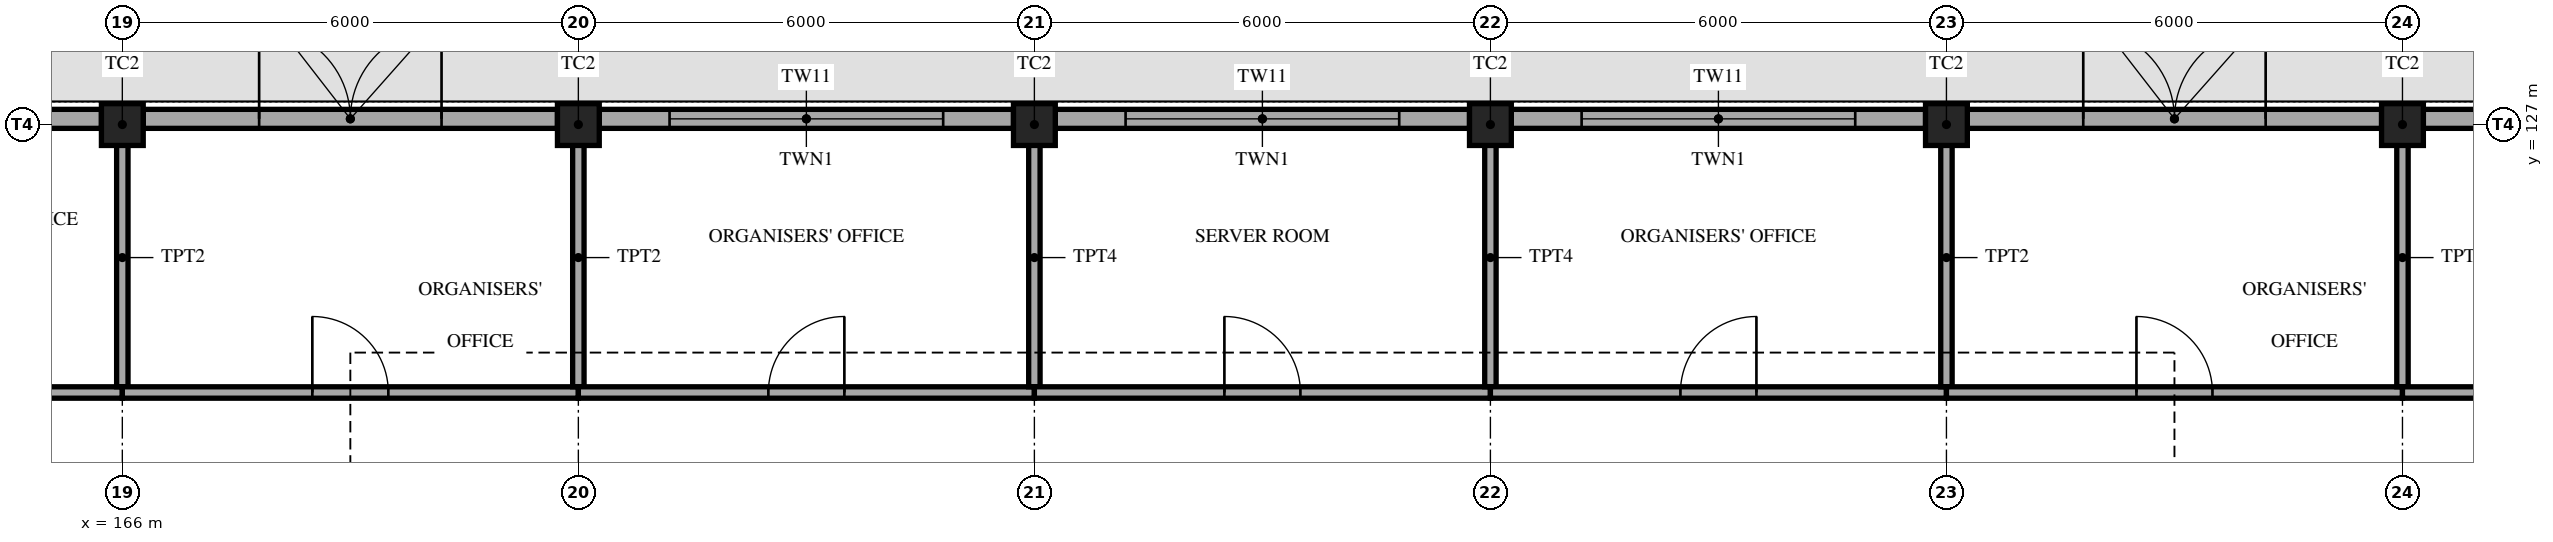
"""IFC4 building model, lengths in metres.
Left out: names, types, materials, properties, quantities, classifications, styles, units other than length and angle.
Written with IfcOpenShell. Run it as: python <this file> out.ifc"""

import sys

from ifc_helpers import new_model, si_unit, direction, frame, frame_2d, origin, origin_2d, place, context, subcontext, project, spatial, polyline, rectangle, hollow_rectangle, outline, extrude, element, fill, save


model = new_model("IFC4")
c1 = context("Model", 3, precision=1e-05, world=origin(), true_north=direction((0.0, 1.0)))
c2 = subcontext(c1, "Body", "Model", "MODEL_VIEW")
j1 = project(units=[si_unit("LENGTHUNIT", "METRE"), si_unit("PLANEANGLEUNIT", "RADIAN")], contexts=[c1])
p1 = place(None, origin())
s1 = spatial("IfcSite", under=j1, at=p1, CompositionType="ELEMENT")
p2 = place(p1, origin())
s2 = spatial("IfcBuilding", under=s1, at=p2, CompositionType="ELEMENT")
p3 = place(p2, frame((0.0, 0.0, 15.0)))
s3 = spatial("IfcBuildingStorey", under=s2, at=p3, CompositionType="ELEMENT", Elevation=15.0)
for number, where, z_axis, x_axis in (
    (1, (166.0, 127.0, 0.0), (0.0, 0.0, 1.0), (1.0, 0.0, 0.0)),
    (2, (172.0, 127.0, 0.0), (0.0, 0.0, 1.0), (1.0, 0.0, 0.0)),
    (3, (178.0, 127.0, 0.0), (0.0, 0.0, 1.0), (1.0, 0.0, 0.0)),
    (4, (184.0, 127.0, 0.0), (0.0, 0.0, 1.0), (1.0, 0.0, 0.0)),
    (5, (190.0, 127.0, 0.0), (0.0, 0.0, 1.0), (1.0, 0.0, 0.0)),
    (6, (196.0, 127.0, 0.0), (0.0, 0.0, 1.0), (1.0, 0.0, 0.0)),
):
    element("IfcColumn", number, at=place(p3, frame(where, z_axis=z_axis, x_axis=x_axis)), inside=s3, PredefinedType="COLUMN", context=c2, shape_type="SweptSolid", body=[
        extrude(hollow_rectangle(XDim=0.55, YDim=0.55, WallThickness=0.032, at=origin_2d()), origin(), (0.0, 0.0, 1.0), 4.2),
    ])
p4 = place(p3, frame((160.275, 127.075, 0.0), z_axis=(0.0, 0.0, 1.0), x_axis=(1.0, 0.0, 0.0)))
e7 = element("IfcWall", 7, at=p4, inside=s3, PredefinedType="SOLIDWALL", context=c2, shape_type="SweptSolid", body=[
    extrude(rectangle(XDim=5.45, YDim=0.25, at=frame_2d((2.725, 0.0))), origin(), (0.0, 0.0, 1.0), 3.55),
])
p5 = place(p4, frame((0.925, 0.0, 0.9)))
e8 = element("IfcOpeningElement", 8, at=p5, cuts=e7, PredefinedType="OPENING", context=c2, shape_type="SweptSolid", body=[
    extrude(rectangle(XDim=3.6, YDim=2.4, at=frame_2d((1.8, 1.2))), frame((0.0, 0.135, 0.0), z_axis=(0.0, -1.0, 0.0), x_axis=(1.0, 0.0, 0.0)), (0.0, 0.0, 1.0), 0.27),
])
p6 = place(p3, frame((172.275, 127.075, 0.0), z_axis=(0.0, 0.0, 1.0), x_axis=(1.0, 0.0, 0.0)))
e9 = element("IfcWall", 9, at=p6, inside=s3, PredefinedType="SOLIDWALL", context=c2, shape_type="SweptSolid", body=[
    extrude(rectangle(XDim=5.45, YDim=0.25, at=frame_2d((2.725, 0.0))), origin(), (0.0, 0.0, 1.0), 3.55),
])
p7 = place(p6, frame((0.925, 0.0, 0.9)))
e10 = element("IfcOpeningElement", 10, at=p7, cuts=e9, PredefinedType="OPENING", context=c2, shape_type="SweptSolid", body=[
    extrude(rectangle(XDim=3.6, YDim=2.4, at=frame_2d((1.8, 1.2))), frame((0.0, 0.135, 0.0), z_axis=(0.0, -1.0, 0.0), x_axis=(1.0, 0.0, 0.0)), (0.0, 0.0, 1.0), 0.27),
])
p8 = place(p3, frame((178.275, 127.075, 0.0), z_axis=(0.0, 0.0, 1.0), x_axis=(1.0, 0.0, 0.0)))
e11 = element("IfcWall", 11, at=p8, inside=s3, PredefinedType="SOLIDWALL", context=c2, shape_type="SweptSolid", body=[
    extrude(rectangle(XDim=5.45, YDim=0.25, at=frame_2d((2.725, 0.0))), origin(), (0.0, 0.0, 1.0), 3.55),
])
p9 = place(p8, frame((0.925, 0.0, 0.9)))
e12 = element("IfcOpeningElement", 12, at=p9, cuts=e11, PredefinedType="OPENING", context=c2, shape_type="SweptSolid", body=[
    extrude(rectangle(XDim=3.6, YDim=2.4, at=frame_2d((1.8, 1.2))), frame((0.0, 0.135, 0.0), z_axis=(0.0, -1.0, 0.0), x_axis=(1.0, 0.0, 0.0)), (0.0, 0.0, 1.0), 0.27),
])
p10 = place(p3, frame((184.275, 127.075, 0.0), z_axis=(0.0, 0.0, 1.0), x_axis=(1.0, 0.0, 0.0)))
e13 = element("IfcWall", 13, at=p10, inside=s3, PredefinedType="SOLIDWALL", context=c2, shape_type="SweptSolid", body=[
    extrude(rectangle(XDim=5.45, YDim=0.25, at=frame_2d((2.725, 0.0))), origin(), (0.0, 0.0, 1.0), 3.55),
])
p11 = place(p10, frame((0.925, 0.0, 0.9)))
e14 = element("IfcOpeningElement", 14, at=p11, cuts=e13, PredefinedType="OPENING", context=c2, shape_type="SweptSolid", body=[
    extrude(rectangle(XDim=3.6, YDim=2.4, at=frame_2d((1.8, 1.2))), frame((0.0, 0.135, 0.0), z_axis=(0.0, -1.0, 0.0), x_axis=(1.0, 0.0, 0.0)), (0.0, 0.0, 1.0), 0.27),
])
p12 = place(p3, frame((196.275, 127.075, 0.0), z_axis=(0.0, 0.0, 1.0), x_axis=(1.0, 0.0, 0.0)))
e15 = element("IfcWall", 15, at=p12, inside=s3, PredefinedType="SOLIDWALL", context=c2, shape_type="SweptSolid", body=[
    extrude(rectangle(XDim=5.45, YDim=0.25, at=frame_2d((2.725, 0.0))), origin(), (0.0, 0.0, 1.0), 3.55),
])
p13 = place(p12, frame((0.925, 0.0, 0.9)))
e16 = element("IfcOpeningElement", 16, at=p13, cuts=e15, PredefinedType="OPENING", context=c2, shape_type="SweptSolid", body=[
    extrude(rectangle(XDim=3.6, YDim=2.4, at=frame_2d((1.8, 1.2))), frame((0.0, 0.135, 0.0), z_axis=(0.0, -1.0, 0.0), x_axis=(1.0, 0.0, 0.0)), (0.0, 0.0, 1.0), 0.27),
])
p14 = place(p3, frame((166.275, 127.075, 0.0), z_axis=(0.0, 0.0, 1.0), x_axis=(1.0, 0.0, 0.0)))
e17 = element("IfcWall", 17, at=p14, inside=s3, PredefinedType="SOLIDWALL", context=c2, shape_type="SweptSolid", body=[
    extrude(rectangle(XDim=5.45, YDim=0.25, at=frame_2d((2.725, 0.0))), origin(), (0.0, 0.0, 1.0), 3.55),
])
p15 = place(p14, frame((1.525, 0.0, 0.0)))
e18 = element("IfcOpeningElement", 18, at=p15, cuts=e17, PredefinedType="OPENING", context=c2, shape_type="SweptSolid", body=[
    extrude(rectangle(XDim=2.4, YDim=2.1, at=frame_2d((1.2, 1.05))), frame((0.0, 0.135, 0.0), z_axis=(0.0, -1.0, 0.0), x_axis=(1.0, 0.0, 0.0)), (0.0, 0.0, 1.0), 0.27),
])
p16 = place(p3, frame((190.275, 127.075, 0.0), z_axis=(0.0, 0.0, 1.0), x_axis=(1.0, 0.0, 0.0)))
e19 = element("IfcWall", 19, at=p16, inside=s3, PredefinedType="SOLIDWALL", context=c2, shape_type="SweptSolid", body=[
    extrude(rectangle(XDim=5.45, YDim=0.25, at=frame_2d((2.725, 0.0))), origin(), (0.0, 0.0, 1.0), 3.55),
])
p17 = place(p16, frame((1.525, 0.0, 0.0)))
e20 = element("IfcOpeningElement", 20, at=p17, cuts=e19, PredefinedType="OPENING", context=c2, shape_type="SweptSolid", body=[
    extrude(rectangle(XDim=2.4, YDim=2.1, at=frame_2d((1.2, 1.05))), frame((0.0, 0.135, 0.0), z_axis=(0.0, -1.0, 0.0), x_axis=(1.0, 0.0, 0.0)), (0.0, 0.0, 1.0), 0.27),
])
p18 = place(p3, frame((160.05, 123.475, 0.0), z_axis=(0.0, 0.0, 1.0), x_axis=(1.0, 0.0, 0.0)))
e21 = element("IfcWall", 21, at=p18, inside=s3, PredefinedType="PARTITIONING", context=c2, shape_type="SweptSolid", body=[
    extrude(rectangle(XDim=5.95, YDim=0.15, at=frame_2d((2.975, 0.0))), origin(), (0.0, 0.0, 1.0), 3.4),
])
p19 = place(p18, frame((2.438, 0.0, 0.0)))
e22 = element("IfcOpeningElement", 22, at=p19, cuts=e21, PredefinedType="OPENING", context=c2, shape_type="SweptSolid", body=[
    extrude(rectangle(XDim=1.0, YDim=2.1, at=frame_2d((0.5, 1.05))), frame((0.0, 0.085, 0.0), z_axis=(0.0, -1.0, 0.0), x_axis=(1.0, 0.0, 0.0)), (0.0, 0.0, 1.0), 0.17),
])
p20 = place(p3, frame((166.0, 123.55, 0.0), z_axis=(0.0, 0.0, 1.0), x_axis=(0.0, 1.0, 0.0)))
e23 = element("IfcWall", 23, at=p20, inside=s3, PredefinedType="PARTITIONING", context=c2, shape_type="SweptSolid", body=[
    extrude(rectangle(XDim=3.4, YDim=0.15, at=frame_2d((1.7, 0.0))), origin(), (0.0, 0.0, 1.0), 3.4),
])
p21 = place(p3, frame((166.0, 123.475, 0.0), z_axis=(0.0, 0.0, 1.0), x_axis=(1.0, 0.0, 0.0)))
e24 = element("IfcWall", 24, at=p21, inside=s3, PredefinedType="PARTITIONING", context=c2, shape_type="SweptSolid", body=[
    extrude(rectangle(XDim=6.0, YDim=0.15, at=frame_2d((3.0, 0.0))), origin(), (0.0, 0.0, 1.0), 3.4),
])
p22 = place(p21, frame((2.5, 0.0, 0.0)))
e25 = element("IfcOpeningElement", 25, at=p22, cuts=e24, PredefinedType="OPENING", context=c2, shape_type="SweptSolid", body=[
    extrude(rectangle(XDim=1.0, YDim=2.1, at=frame_2d((0.5, 1.05))), frame((0.0, 0.085, 0.0), z_axis=(0.0, -1.0, 0.0), x_axis=(1.0, 0.0, 0.0)), (0.0, 0.0, 1.0), 0.17),
])
p23 = place(p3, frame((172.0, 123.55, 0.0), z_axis=(0.0, 0.0, 1.0), x_axis=(0.0, 1.0, 0.0)))
e26 = element("IfcWall", 26, at=p23, inside=s3, PredefinedType="PARTITIONING", context=c2, shape_type="SweptSolid", body=[
    extrude(rectangle(XDim=3.4, YDim=0.15, at=frame_2d((1.7, 0.0))), origin(), (0.0, 0.0, 1.0), 3.4),
])
p24 = place(p3, frame((172.0, 123.475, 0.0), z_axis=(0.0, 0.0, 1.0), x_axis=(1.0, 0.0, 0.0)))
e27 = element("IfcWall", 27, at=p24, inside=s3, PredefinedType="PARTITIONING", context=c2, shape_type="SweptSolid", body=[
    extrude(rectangle(XDim=6.0, YDim=0.15, at=frame_2d((3.0, 0.0))), origin(), (0.0, 0.0, 1.0), 3.4),
])
p25 = place(p24, frame((2.5, 0.0, 0.0)))
e28 = element("IfcOpeningElement", 28, at=p25, cuts=e27, PredefinedType="OPENING", context=c2, shape_type="SweptSolid", body=[
    extrude(rectangle(XDim=1.0, YDim=2.1, at=frame_2d((0.5, 1.05))), frame((0.0, 0.085, 0.0), z_axis=(0.0, -1.0, 0.0), x_axis=(1.0, 0.0, 0.0)), (0.0, 0.0, 1.0), 0.17),
])
p26 = place(p3, frame((178.0, 123.55, 0.0), z_axis=(0.0, 0.0, 1.0), x_axis=(0.0, 1.0, 0.0)))
e29 = element("IfcWall", 29, at=p26, inside=s3, PredefinedType="PARTITIONING", context=c2, shape_type="SweptSolid", body=[
    extrude(rectangle(XDim=3.4, YDim=0.15, at=frame_2d((1.7, 0.0))), origin(), (0.0, 0.0, 1.0), 3.4),
])
p27 = place(p3, frame((178.0, 123.475, 0.0), z_axis=(0.0, 0.0, 1.0), x_axis=(1.0, 0.0, 0.0)))
e30 = element("IfcWall", 30, at=p27, inside=s3, PredefinedType="PARTITIONING", context=c2, shape_type="SweptSolid", body=[
    extrude(rectangle(XDim=6.0, YDim=0.15, at=frame_2d((3.0, 0.0))), origin(), (0.0, 0.0, 1.0), 3.4),
])
p28 = place(p27, frame((2.5, 0.0, 0.0)))
e31 = element("IfcOpeningElement", 31, at=p28, cuts=e30, PredefinedType="OPENING", context=c2, shape_type="SweptSolid", body=[
    extrude(rectangle(XDim=1.0, YDim=2.1, at=frame_2d((0.5, 1.05))), frame((0.0, 0.085, 0.0), z_axis=(0.0, -1.0, 0.0), x_axis=(1.0, 0.0, 0.0)), (0.0, 0.0, 1.0), 0.17),
])
p29 = place(p3, frame((184.0, 123.55, 0.0), z_axis=(0.0, 0.0, 1.0), x_axis=(0.0, 1.0, 0.0)))
e32 = element("IfcWall", 32, at=p29, inside=s3, PredefinedType="PARTITIONING", context=c2, shape_type="SweptSolid", body=[
    extrude(rectangle(XDim=3.4, YDim=0.15, at=frame_2d((1.7, 0.0))), origin(), (0.0, 0.0, 1.0), 3.4),
])
p30 = place(p3, frame((184.0, 123.475, 0.0), z_axis=(0.0, 0.0, 1.0), x_axis=(1.0, 0.0, 0.0)))
e33 = element("IfcWall", 33, at=p30, inside=s3, PredefinedType="PARTITIONING", context=c2, shape_type="SweptSolid", body=[
    extrude(rectangle(XDim=6.0, YDim=0.15, at=frame_2d((3.0, 0.0))), origin(), (0.0, 0.0, 1.0), 3.4),
])
p31 = place(p30, frame((2.5, 0.0, 0.0)))
e34 = element("IfcOpeningElement", 34, at=p31, cuts=e33, PredefinedType="OPENING", context=c2, shape_type="SweptSolid", body=[
    extrude(rectangle(XDim=1.0, YDim=2.1, at=frame_2d((0.5, 1.05))), frame((0.0, 0.085, 0.0), z_axis=(0.0, -1.0, 0.0), x_axis=(1.0, 0.0, 0.0)), (0.0, 0.0, 1.0), 0.17),
])
p32 = place(p3, frame((190.0, 123.55, 0.0), z_axis=(0.0, 0.0, 1.0), x_axis=(0.0, 1.0, 0.0)))
e35 = element("IfcWall", 35, at=p32, inside=s3, PredefinedType="PARTITIONING", context=c2, shape_type="SweptSolid", body=[
    extrude(rectangle(XDim=3.4, YDim=0.15, at=frame_2d((1.7, 0.0))), origin(), (0.0, 0.0, 1.0), 3.4),
])
p33 = place(p3, frame((190.0, 123.475, 0.0), z_axis=(0.0, 0.0, 1.0), x_axis=(1.0, 0.0, 0.0)))
e36 = element("IfcWall", 36, at=p33, inside=s3, PredefinedType="PARTITIONING", context=c2, shape_type="SweptSolid", body=[
    extrude(rectangle(XDim=6.0, YDim=0.15, at=frame_2d((3.0, 0.0))), origin(), (0.0, 0.0, 1.0), 3.4),
])
p34 = place(p33, frame((2.5, 0.0, 0.0)))
e37 = element("IfcOpeningElement", 37, at=p34, cuts=e36, PredefinedType="OPENING", context=c2, shape_type="SweptSolid", body=[
    extrude(rectangle(XDim=1.0, YDim=2.1, at=frame_2d((0.5, 1.05))), frame((0.0, 0.085, 0.0), z_axis=(0.0, -1.0, 0.0), x_axis=(1.0, 0.0, 0.0)), (0.0, 0.0, 1.0), 0.17),
])
p35 = place(p3, frame((196.0, 123.55, 0.0), z_axis=(0.0, 0.0, 1.0), x_axis=(0.0, 1.0, 0.0)))
e38 = element("IfcWall", 38, at=p35, inside=s3, PredefinedType="PARTITIONING", context=c2, shape_type="SweptSolid", body=[
    extrude(rectangle(XDim=3.4, YDim=0.15, at=frame_2d((1.7, 0.0))), origin(), (0.0, 0.0, 1.0), 3.4),
])
p36 = place(p3, frame((196.0, 123.475, 0.0), z_axis=(0.0, 0.0, 1.0), x_axis=(1.0, 0.0, 0.0)))
e39 = element("IfcWall", 39, at=p36, inside=s3, PredefinedType="PARTITIONING", context=c2, shape_type="SweptSolid", body=[
    extrude(rectangle(XDim=5.95, YDim=0.15, at=frame_2d((2.975, 0.0))), origin(), (0.0, 0.0, 1.0), 3.4),
])
p37 = place(p36, frame((2.512, 0.0, 0.0)))
e40 = element("IfcOpeningElement", 40, at=p37, cuts=e39, PredefinedType="OPENING", context=c2, shape_type="SweptSolid", body=[
    extrude(rectangle(XDim=1.0, YDim=2.1, at=frame_2d((0.5, 1.05))), frame((0.0, 0.085, 0.0), z_axis=(0.0, -1.0, 0.0), x_axis=(1.0, 0.0, 0.0)), (0.0, 0.0, 1.0), 0.17),
])
p38 = place(p7, origin())
e41 = element("IfcWindow", 41, at=p38, inside=s3, PartitioningType="TRIPLE_PANEL_VERTICAL", PredefinedType="WINDOW", context=c2, shape_type="SweptSolid", body=[
    extrude(outline(polyline([(0.0, 0.0), (3.6, 0.0), (3.6, 2.4), (0.0, 2.4), (0.0, 0.0)]), holes=[polyline([(0.06, 0.06), (0.96, 0.06), (0.96, 2.34), (0.06, 2.34), (0.06, 0.06)]), polyline([(1.06, 0.06), (2.54, 0.06), (2.54, 2.34), (1.06, 2.34), (1.06, 0.06)]), polyline([(2.64, 0.06), (3.54, 0.06), (3.54, 2.34), (2.64, 2.34), (2.64, 0.06)])]), frame((0.0, 0.03, 0.0), z_axis=(0.0, -1.0, 0.0), x_axis=(1.0, 0.0, 0.0)), (0.0, 0.0, 1.0), 0.06),
    extrude(rectangle(XDim=0.924, YDim=2.304, at=frame_2d((0.51, 1.2))), frame((0.0, 0.01, 0.0), z_axis=(0.0, -1.0, 0.0), x_axis=(1.0, 0.0, 0.0)), (0.0, 0.0, 1.0), 0.02),
    extrude(rectangle(XDim=1.504, YDim=2.304, at=frame_2d((1.8, 1.2))), frame((0.0, 0.01, 0.0), z_axis=(0.0, -1.0, 0.0), x_axis=(1.0, 0.0, 0.0)), (0.0, 0.0, 1.0), 0.02),
    extrude(rectangle(XDim=0.924, YDim=2.304, at=frame_2d((3.09, 1.2))), frame((0.0, 0.01, 0.0), z_axis=(0.0, -1.0, 0.0), x_axis=(1.0, 0.0, 0.0)), (0.0, 0.0, 1.0), 0.02),
])
fill(e10, e41)
p39 = place(p9, origin())
e42 = element("IfcWindow", 42, at=p39, inside=s3, PartitioningType="TRIPLE_PANEL_VERTICAL", PredefinedType="WINDOW", context=c2, shape_type="SweptSolid", body=[
    extrude(outline(polyline([(0.0, 0.0), (3.6, 0.0), (3.6, 2.4), (0.0, 2.4), (0.0, 0.0)]), holes=[polyline([(0.06, 0.06), (0.96, 0.06), (0.96, 2.34), (0.06, 2.34), (0.06, 0.06)]), polyline([(1.06, 0.06), (2.54, 0.06), (2.54, 2.34), (1.06, 2.34), (1.06, 0.06)]), polyline([(2.64, 0.06), (3.54, 0.06), (3.54, 2.34), (2.64, 2.34), (2.64, 0.06)])]), frame((0.0, 0.03, 0.0), z_axis=(0.0, -1.0, 0.0), x_axis=(1.0, 0.0, 0.0)), (0.0, 0.0, 1.0), 0.06),
    extrude(rectangle(XDim=0.924, YDim=2.304, at=frame_2d((0.51, 1.2))), frame((0.0, 0.01, 0.0), z_axis=(0.0, -1.0, 0.0), x_axis=(1.0, 0.0, 0.0)), (0.0, 0.0, 1.0), 0.02),
    extrude(rectangle(XDim=1.504, YDim=2.304, at=frame_2d((1.8, 1.2))), frame((0.0, 0.01, 0.0), z_axis=(0.0, -1.0, 0.0), x_axis=(1.0, 0.0, 0.0)), (0.0, 0.0, 1.0), 0.02),
    extrude(rectangle(XDim=0.924, YDim=2.304, at=frame_2d((3.09, 1.2))), frame((0.0, 0.01, 0.0), z_axis=(0.0, -1.0, 0.0), x_axis=(1.0, 0.0, 0.0)), (0.0, 0.0, 1.0), 0.02),
])
fill(e12, e42)
p40 = place(p11, origin())
e43 = element("IfcWindow", 43, at=p40, inside=s3, PartitioningType="TRIPLE_PANEL_VERTICAL", PredefinedType="WINDOW", context=c2, shape_type="SweptSolid", body=[
    extrude(outline(polyline([(0.0, 0.0), (3.6, 0.0), (3.6, 2.4), (0.0, 2.4), (0.0, 0.0)]), holes=[polyline([(0.06, 0.06), (0.96, 0.06), (0.96, 2.34), (0.06, 2.34), (0.06, 0.06)]), polyline([(1.06, 0.06), (2.54, 0.06), (2.54, 2.34), (1.06, 2.34), (1.06, 0.06)]), polyline([(2.64, 0.06), (3.54, 0.06), (3.54, 2.34), (2.64, 2.34), (2.64, 0.06)])]), frame((0.0, 0.03, 0.0), z_axis=(0.0, -1.0, 0.0), x_axis=(1.0, 0.0, 0.0)), (0.0, 0.0, 1.0), 0.06),
    extrude(rectangle(XDim=0.924, YDim=2.304, at=frame_2d((0.51, 1.2))), frame((0.0, 0.01, 0.0), z_axis=(0.0, -1.0, 0.0), x_axis=(1.0, 0.0, 0.0)), (0.0, 0.0, 1.0), 0.02),
    extrude(rectangle(XDim=1.504, YDim=2.304, at=frame_2d((1.8, 1.2))), frame((0.0, 0.01, 0.0), z_axis=(0.0, -1.0, 0.0), x_axis=(1.0, 0.0, 0.0)), (0.0, 0.0, 1.0), 0.02),
    extrude(rectangle(XDim=0.924, YDim=2.304, at=frame_2d((3.09, 1.2))), frame((0.0, 0.01, 0.0), z_axis=(0.0, -1.0, 0.0), x_axis=(1.0, 0.0, 0.0)), (0.0, 0.0, 1.0), 0.02),
])
fill(e14, e43)
p41 = place(p15, origin())
e44 = element("IfcDoor", 44, at=p41, inside=s3, OperationType="DOUBLE_DOOR_SINGLE_SWING", PredefinedType="DOOR", context=c2, shape_type="SweptSolid", body=[
    extrude(rectangle(XDim=2.4, YDim=2.1, at=frame_2d((1.2, 1.05))), frame((0.0, 0.025, 0.0), z_axis=(0.0, -1.0, 0.0), x_axis=(1.0, 0.0, 0.0)), (0.0, 0.0, 1.0), 0.05),
])
fill(e18, e44)
p42 = place(p17, origin())
e45 = element("IfcDoor", 45, at=p42, inside=s3, OperationType="DOUBLE_DOOR_SINGLE_SWING", PredefinedType="DOOR", context=c2, shape_type="SweptSolid", body=[
    extrude(rectangle(XDim=2.4, YDim=2.1, at=frame_2d((1.2, 1.05))), frame((0.0, 0.025, 0.0), z_axis=(0.0, -1.0, 0.0), x_axis=(1.0, 0.0, 0.0)), (0.0, 0.0, 1.0), 0.05),
])
fill(e20, e45)
p43 = place(p22, origin())
e46 = element("IfcDoor", 46, at=p43, inside=s3, OperationType="SINGLE_SWING_LEFT", PredefinedType="DOOR", context=c2, shape_type="SweptSolid", body=[
    extrude(rectangle(XDim=1.0, YDim=2.1, at=frame_2d((0.5, 1.05))), frame((0.0, 0.025, 0.0), z_axis=(0.0, -1.0, 0.0), x_axis=(1.0, 0.0, 0.0)), (0.0, 0.0, 1.0), 0.05),
])
fill(e25, e46)
p44 = place(p25, origin())
e47 = element("IfcDoor", 47, at=p44, inside=s3, OperationType="SINGLE_SWING_RIGHT", PredefinedType="DOOR", context=c2, shape_type="SweptSolid", body=[
    extrude(rectangle(XDim=1.0, YDim=2.1, at=frame_2d((0.5, 1.05))), frame((0.0, 0.025, 0.0), z_axis=(0.0, -1.0, 0.0), x_axis=(1.0, 0.0, 0.0)), (0.0, 0.0, 1.0), 0.05),
])
fill(e28, e47)
p45 = place(p28, origin())
e48 = element("IfcDoor", 48, at=p45, inside=s3, OperationType="SINGLE_SWING_LEFT", PredefinedType="DOOR", context=c2, shape_type="SweptSolid", body=[
    extrude(rectangle(XDim=1.0, YDim=2.1, at=frame_2d((0.5, 1.05))), frame((0.0, 0.025, 0.0), z_axis=(0.0, -1.0, 0.0), x_axis=(1.0, 0.0, 0.0)), (0.0, 0.0, 1.0), 0.05),
])
fill(e31, e48)
p46 = place(p31, origin())
e49 = element("IfcDoor", 49, at=p46, inside=s3, OperationType="SINGLE_SWING_RIGHT", PredefinedType="DOOR", context=c2, shape_type="SweptSolid", body=[
    extrude(rectangle(XDim=1.0, YDim=2.1, at=frame_2d((0.5, 1.05))), frame((0.0, 0.025, 0.0), z_axis=(0.0, -1.0, 0.0), x_axis=(1.0, 0.0, 0.0)), (0.0, 0.0, 1.0), 0.05),
])
fill(e34, e49)
p47 = place(p34, origin())
e50 = element("IfcDoor", 50, at=p47, inside=s3, OperationType="SINGLE_SWING_LEFT", PredefinedType="DOOR", context=c2, shape_type="SweptSolid", body=[
    extrude(rectangle(XDim=1.0, YDim=2.1, at=frame_2d((0.5, 1.05))), frame((0.0, 0.025, 0.0), z_axis=(0.0, -1.0, 0.0), x_axis=(1.0, 0.0, 0.0)), (0.0, 0.0, 1.0), 0.05),
])
fill(e37, e50)
save(model, sys.argv[1])
